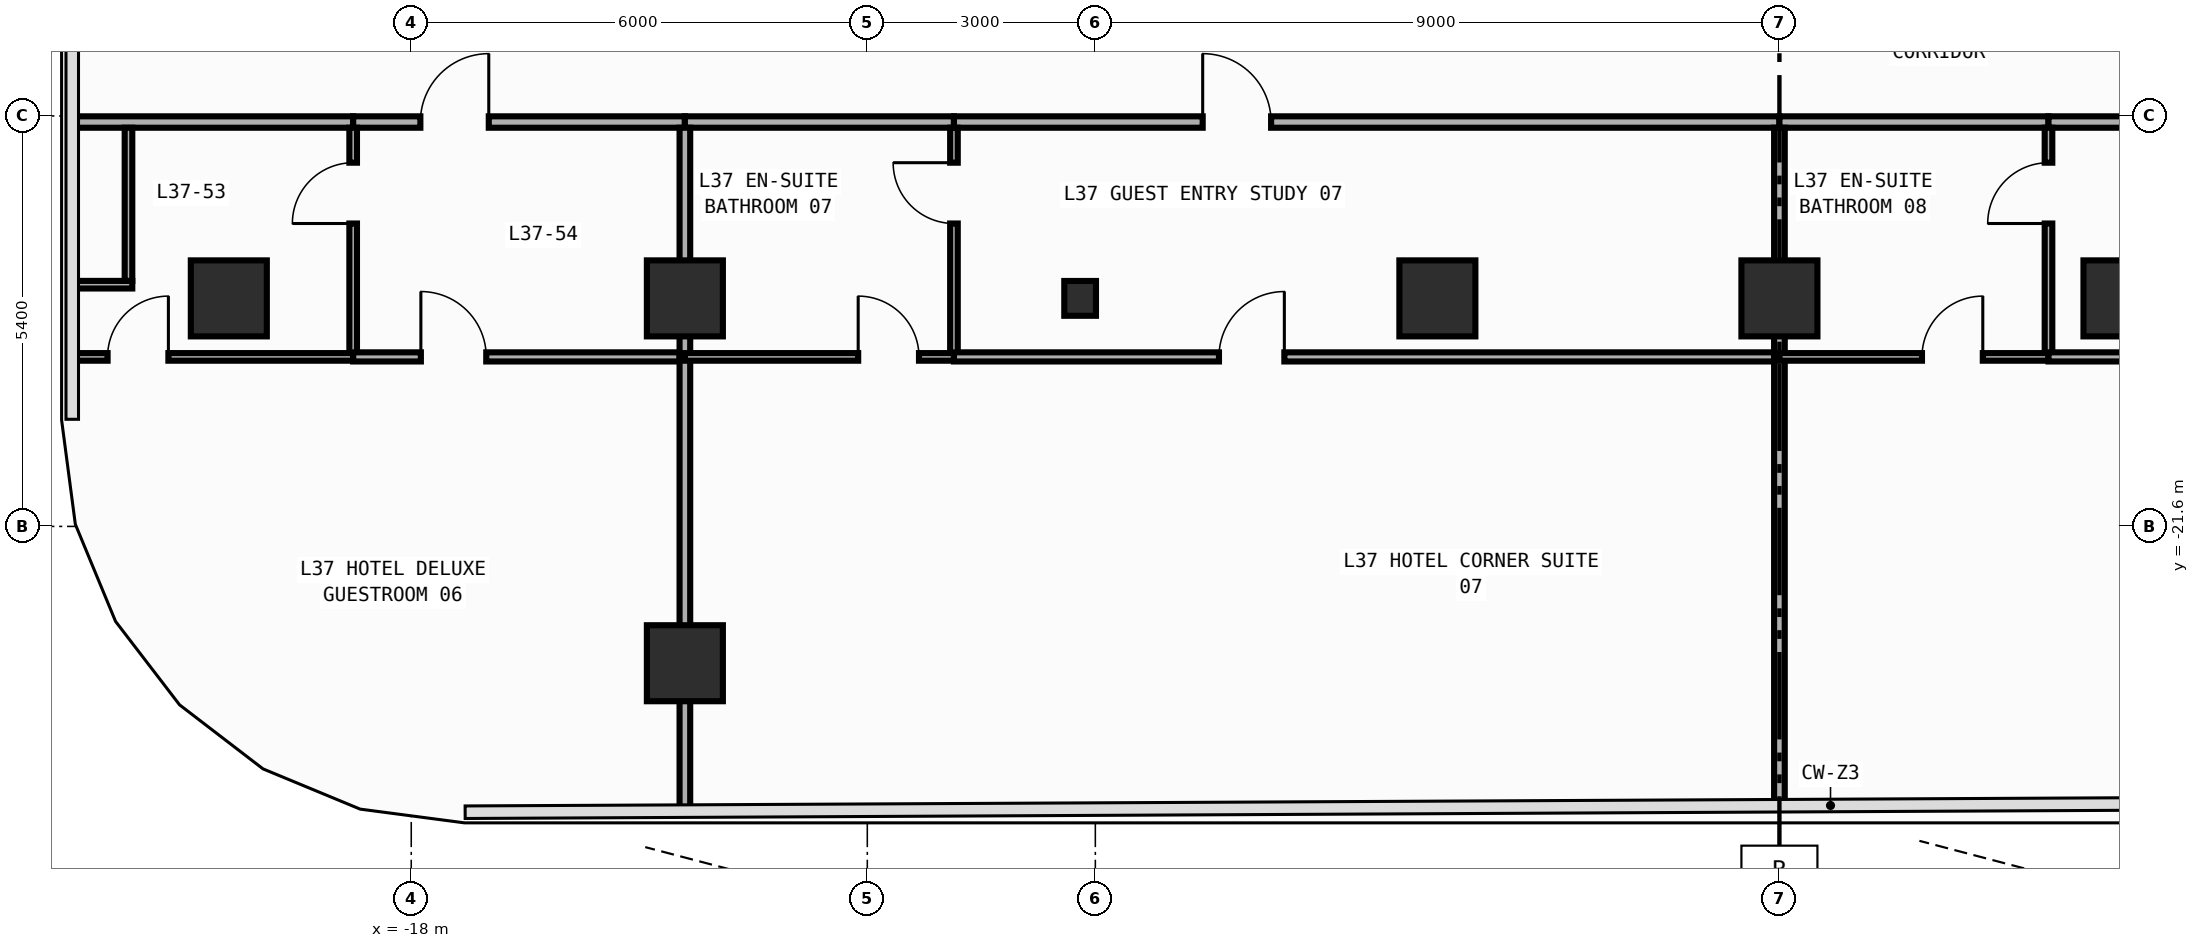
"""IFC4 building model, lengths in metres.
Left out: names, types, materials, properties, quantities, classifications, styles, units other than length and angle.
Written with IfcOpenShell. Run it as: python <this file> out.ifc"""

import sys

from ifc_helpers import new_model, si_unit, direction, frame, frame_2d, origin, origin_2d, place, context, subcontext, project, spatial, rectangle, i_section, extrude, element, fill, save


model = new_model("IFC4")
c1 = context("Model", 3, precision=1e-05, world=origin(), true_north=direction((0.0, 1.0)))
c2 = subcontext(c1, "Body", "Model", "MODEL_VIEW")
j1 = project(units=[si_unit("LENGTHUNIT", "METRE"), si_unit("PLANEANGLEUNIT", "RADIAN")], contexts=[c1])
p1 = place(None, origin())
s1 = spatial("IfcSite", under=j1, at=p1, CompositionType="ELEMENT")
p2 = place(p1, origin())
s2 = spatial("IfcBuilding", under=s1, at=p2, CompositionType="ELEMENT")
p3 = place(p2, frame((0.0, 0.0, 165.0)))
s3 = spatial("IfcBuildingStorey", under=s2, at=p3, CompositionType="ELEMENT", Elevation=165.0)
p4 = place(p3, frame((-9.2, -18.6, 0.0), z_axis=(0.0, 0.0, 1.0), x_axis=(1.0, 0.0, 0.0)))
e1 = element("IfcColumn", 1, at=p4, inside=s3, PredefinedType="COLUMN", context=c2, shape_type="SweptSolid", body=[
    extrude(i_section(OverallWidth=0.417, OverallDepth=0.458, WebThickness=0.03, FlangeThickness=0.05, FilletRadius=0.022, at=origin_2d()), origin(), (0.0, 0.0, 1.0), 3.8),
])
for number, where, z_axis, x_axis in (
    (2, (-20.4, -18.6, 0.0), (0.0, 0.0, 1.0), (1.0, 0.0, 0.0)),
    (3, (-14.4, -18.6, 0.0), (0.0, 0.0, 1.0), (1.0, 0.0, 0.0)),
    (4, (-4.5, -18.6, 0.0), (0.0, 0.0, 1.0), (1.0, 0.0, 0.0)),
    (5, (0.0, -18.6, 0.0), (0.0, 0.0, 1.0), (1.0, 0.0, 0.0)),
    (6, (4.5, -18.6, 0.0), (0.0, 0.0, 1.0), (1.0, 0.0, 0.0)),
    (7, (-14.4, -23.4, 0.0), (0.0, 0.0, 1.0), (1.0, 0.0, 0.0)),
):
    element("IfcColumn", number, at=place(p3, frame(where, z_axis=z_axis, x_axis=x_axis)), inside=s3, PredefinedType="COLUMN", context=c2, shape_type="SweptSolid", body=[
        extrude(rectangle(XDim=1.0, YDim=1.0, at=origin_2d()), origin(), (0.0, 0.0, 1.0), 3.8),
    ])
p5 = place(p3, frame((-22.455, -16.28, 0.0), z_axis=(0.0, 0.0, 1.0), x_axis=(1.0, 0.0, 0.0)))
e8 = element("IfcWall", 8, at=p5, inside=s3, PredefinedType="PARTITIONING", context=c2, shape_type="SweptSolid", body=[
    extrude(rectangle(XDim=3.691, YDim=0.15, at=frame_2d((1.846, 0.0))), origin(), (0.0, 0.0, 1.0), 3.54),
])
p6 = place(p3, frame((-18.764, -16.28, 0.0), z_axis=(0.0, 0.0, 1.0), x_axis=(1.0, 0.0, 0.0)))
e9 = element("IfcWall", 9, at=p6, inside=s3, PredefinedType="PARTITIONING", context=c2, shape_type="SweptSolid", body=[
    extrude(rectangle(XDim=4.364, YDim=0.15, at=frame_2d((2.182, 0.0))), origin(), (0.0, 0.0, 1.0), 3.54),
])
p7 = place(p6, frame((0.884, 0.0, 0.0)))
e10 = element("IfcOpeningElement", 10, at=p7, cuts=e9, PredefinedType="OPENING", context=c2, shape_type="SweptSolid", body=[
    extrude(rectangle(XDim=0.9, YDim=2.15, at=frame_2d((0.45, 1.075))), frame((0.0, 0.085, 0.0), z_axis=(0.0, -1.0, 0.0), x_axis=(1.0, 0.0, 0.0)), (0.0, 0.0, 1.0), 0.17),
])
p8 = place(p3, frame((-14.4, -16.28, 0.0), z_axis=(0.0, 0.0, 1.0), x_axis=(1.0, 0.0, 0.0)))
e11 = element("IfcWall", 11, at=p8, inside=s3, PredefinedType="PARTITIONING", context=c2, shape_type="SweptSolid", body=[
    extrude(rectangle(XDim=3.54, YDim=0.15, at=frame_2d((1.77, 0.0))), origin(), (0.0, 0.0, 1.0), 3.54),
])
p9 = place(p3, frame((-10.86, -16.28, 0.0), z_axis=(0.0, 0.0, 1.0), x_axis=(1.0, 0.0, 0.0)))
e12 = element("IfcWall", 12, at=p9, inside=s3, PredefinedType="PARTITIONING", context=c2, shape_type="SweptSolid", body=[
    extrude(rectangle(XDim=10.86, YDim=0.15, at=frame_2d((5.43, 0.0))), origin(), (0.0, 0.0, 1.0), 3.54),
])
p10 = place(p9, frame((3.272, 0.0, 0.0)))
e13 = element("IfcOpeningElement", 13, at=p10, cuts=e12, PredefinedType="OPENING", context=c2, shape_type="SweptSolid", body=[
    extrude(rectangle(XDim=0.9, YDim=2.15, at=frame_2d((0.45, 1.075))), frame((0.0, 0.085, 0.0), z_axis=(0.0, -1.0, 0.0), x_axis=(1.0, 0.0, 0.0)), (0.0, 0.0, 1.0), 0.17),
])
p11 = place(p3, frame((0.0, -16.28, 0.0), z_axis=(0.0, 0.0, 1.0), x_axis=(1.0, 0.0, 0.0)))
e14 = element("IfcWall", 14, at=p11, inside=s3, PredefinedType="PARTITIONING", context=c2, shape_type="SweptSolid", body=[
    extrude(rectangle(XDim=3.54, YDim=0.15, at=frame_2d((1.77, 0.0))), origin(), (0.0, 0.0, 1.0), 3.54),
])
p12 = place(p3, frame((3.54, -16.28, 0.0), z_axis=(0.0, 0.0, 1.0), x_axis=(1.0, 0.0, 0.0)))
e15 = element("IfcWall", 15, at=p12, inside=s3, PredefinedType="PARTITIONING", context=c2, shape_type="SweptSolid", body=[
    extrude(rectangle(XDim=8.7, YDim=0.15, at=frame_2d((4.35, 0.0))), origin(), (0.0, 0.0, 1.0), 3.54),
])
p13 = place(p12, frame((7.34, 0.0, 0.0)))
e16 = element("IfcOpeningElement", 16, at=p13, cuts=e15, PredefinedType="OPENING", context=c2, shape_type="SweptSolid", body=[
    extrude(rectangle(XDim=0.9, YDim=2.15, at=frame_2d((0.45, 1.075))), frame((0.0, 0.085, 0.0), z_axis=(0.0, -1.0, 0.0), x_axis=(1.0, 0.0, 0.0)), (0.0, 0.0, 1.0), 0.17),
])
p14 = place(p3, frame((-18.764, -19.32, 0.0), z_axis=(0.0, 0.0, 1.0), x_axis=(0.0, 1.0, 0.0)))
e17 = element("IfcWall", 17, at=p14, inside=s3, PredefinedType="PARTITIONING", context=c2, shape_type="SweptSolid", body=[
    extrude(rectangle(XDim=2.965, YDim=0.1, at=frame_2d((1.482, 0.0))), origin(), (0.0, 0.0, 1.0), 3.54),
])
p15 = place(p14, frame((1.705, 0.0, 0.0)))
e18 = element("IfcOpeningElement", 18, at=p15, cuts=e17, PredefinedType="OPENING", context=c2, shape_type="SweptSolid", body=[
    extrude(rectangle(XDim=0.8, YDim=2.1, at=frame_2d((0.4, 1.05))), frame((0.0, 0.06, 0.0), z_axis=(0.0, -1.0, 0.0), x_axis=(1.0, 0.0, 0.0)), (0.0, 0.0, 1.0), 0.12),
])
p16 = place(p3, frame((-22.455, -19.37, 0.0), z_axis=(0.0, 0.0, 1.0), x_axis=(1.0, 0.0, 0.0)))
e19 = element("IfcWall", 19, at=p16, inside=s3, PredefinedType="PARTITIONING", context=c2, shape_type="SweptSolid", body=[
    extrude(rectangle(XDim=3.691, YDim=0.1, at=frame_2d((1.846, 0.0))), origin(), (0.0, 0.0, 1.0), 3.54),
])
p17 = place(p16, frame((0.46, 0.0, 0.0)))
e20 = element("IfcOpeningElement", 20, at=p17, cuts=e19, PredefinedType="OPENING", context=c2, shape_type="SweptSolid", body=[
    extrude(rectangle(XDim=0.8, YDim=2.1, at=frame_2d((0.4, 1.05))), frame((0.0, 0.06, 0.0), z_axis=(0.0, -1.0, 0.0), x_axis=(1.0, 0.0, 0.0)), (0.0, 0.0, 1.0), 0.12),
])
p18 = place(p3, frame((-18.764, -19.37, 0.0), z_axis=(0.0, 0.0, 1.0), x_axis=(1.0, 0.0, 0.0)))
e21 = element("IfcWall", 21, at=p18, inside=s3, PredefinedType="PARTITIONING", context=c2, shape_type="SweptSolid", body=[
    extrude(rectangle(XDim=4.364, YDim=0.12, at=frame_2d((2.182, 0.0))), origin(), (0.0, 0.0, 1.0), 3.54),
])
p19 = place(p18, frame((0.891, 0.0, 0.0)))
e22 = element("IfcOpeningElement", 22, at=p19, cuts=e21, PredefinedType="OPENING", context=c2, shape_type="SweptSolid", body=[
    extrude(rectangle(XDim=0.86, YDim=2.15, at=frame_2d((0.43, 1.075))), frame((0.0, 0.07, 0.0), z_axis=(0.0, -1.0, 0.0), x_axis=(1.0, 0.0, 0.0)), (0.0, 0.0, 1.0), 0.14),
])
p20 = place(p3, frame((-14.4, -19.37, 0.0), z_axis=(0.0, 0.0, 1.0), x_axis=(0.0, 1.0, 0.0)))
e23 = element("IfcWall", 23, at=p20, inside=s3, PredefinedType="PARTITIONING", context=c2, shape_type="SweptSolid", body=[
    extrude(rectangle(XDim=3.015, YDim=0.14, at=frame_2d((1.508, 0.0))), origin(), (0.0, 0.0, 1.0), 2.952),
])
p21 = place(p3, frame((-14.4, -25.341, 0.0), z_axis=(0.0, 0.0, 1.0), x_axis=(0.0, 1.0, 0.0)))
e24 = element("IfcWall", 24, at=p21, inside=s3, PredefinedType="PARTITIONING", context=c2, shape_type="SweptSolid", body=[
    extrude(rectangle(XDim=5.971, YDim=0.14, at=frame_2d((2.985, 0.0))), origin(), (0.0, 0.0, 1.0), 2.952),
])
p22 = place(p3, frame((-10.86, -19.32, 0.0), z_axis=(0.0, 0.0, 1.0), x_axis=(0.0, 1.0, 0.0)))
e25 = element("IfcWall", 25, at=p22, inside=s3, PredefinedType="PARTITIONING", context=c2, shape_type="SweptSolid", body=[
    extrude(rectangle(XDim=2.965, YDim=0.1, at=frame_2d((1.482, 0.0))), origin(), (0.0, 0.0, 1.0), 3.54),
])
p23 = place(p22, frame((1.705, 0.0, 0.0)))
e26 = element("IfcOpeningElement", 26, at=p23, cuts=e25, PredefinedType="OPENING", context=c2, shape_type="SweptSolid", body=[
    extrude(rectangle(XDim=0.8, YDim=2.1, at=frame_2d((0.4, 1.05))), frame((0.0, 0.06, 0.0), z_axis=(0.0, -1.0, 0.0), x_axis=(1.0, 0.0, 0.0)), (0.0, 0.0, 1.0), 0.12),
])
p24 = place(p3, frame((-14.4, -19.37, 0.0), z_axis=(0.0, 0.0, 1.0), x_axis=(1.0, 0.0, 0.0)))
e27 = element("IfcWall", 27, at=p24, inside=s3, PredefinedType="PARTITIONING", context=c2, shape_type="SweptSolid", body=[
    extrude(rectangle(XDim=3.54, YDim=0.1, at=frame_2d((1.77, 0.0))), origin(), (0.0, 0.0, 1.0), 3.54),
])
p25 = place(p24, frame((2.28, 0.0, 0.0)))
e28 = element("IfcOpeningElement", 28, at=p25, cuts=e27, PredefinedType="OPENING", context=c2, shape_type="SweptSolid", body=[
    extrude(rectangle(XDim=0.8, YDim=2.1, at=frame_2d((0.4, 1.05))), frame((0.0, 0.06, 0.0), z_axis=(0.0, -1.0, 0.0), x_axis=(1.0, 0.0, 0.0)), (0.0, 0.0, 1.0), 0.12),
])
p26 = place(p3, frame((-10.86, -19.37, 0.0), z_axis=(0.0, 0.0, 1.0), x_axis=(1.0, 0.0, 0.0)))
e29 = element("IfcWall", 29, at=p26, inside=s3, PredefinedType="PARTITIONING", context=c2, shape_type="SweptSolid", body=[
    extrude(rectangle(XDim=10.86, YDim=0.12, at=frame_2d((5.43, 0.0))), origin(), (0.0, 0.0, 1.0), 3.54),
])
p27 = place(p26, frame((3.487, 0.0, 0.0)))
e30 = element("IfcOpeningElement", 30, at=p27, cuts=e29, PredefinedType="OPENING", context=c2, shape_type="SweptSolid", body=[
    extrude(rectangle(XDim=0.86, YDim=2.15, at=frame_2d((0.43, 1.075))), frame((0.0, 0.07, 0.0), z_axis=(0.0, -1.0, 0.0), x_axis=(1.0, 0.0, 0.0)), (0.0, 0.0, 1.0), 0.14),
])
p28 = place(p3, frame((0.0, -19.37, 0.0), z_axis=(0.0, 0.0, 1.0), x_axis=(0.0, 1.0, 0.0)))
e31 = element("IfcWall", 31, at=p28, inside=s3, PredefinedType="PARTITIONING", context=c2, shape_type="SweptSolid", body=[
    extrude(rectangle(XDim=3.015, YDim=0.14, at=frame_2d((1.508, 0.0))), origin(), (0.0, 0.0, 1.0), 3.54),
])
p29 = place(p3, frame((0.0, -25.27, 0.0), z_axis=(0.0, 0.0, 1.0), x_axis=(0.0, 1.0, 0.0)))
e32 = element("IfcWall", 32, at=p29, inside=s3, PredefinedType="PARTITIONING", context=c2, shape_type="SweptSolid", body=[
    extrude(rectangle(XDim=5.9, YDim=0.14, at=frame_2d((2.95, 0.0))), origin(), (0.0, 0.0, 1.0), 3.54),
])
p30 = place(p3, frame((3.54, -19.32, 0.0), z_axis=(0.0, 0.0, 1.0), x_axis=(0.0, 1.0, 0.0)))
e33 = element("IfcWall", 33, at=p30, inside=s3, PredefinedType="PARTITIONING", context=c2, shape_type="SweptSolid", body=[
    extrude(rectangle(XDim=2.965, YDim=0.1, at=frame_2d((1.482, 0.0))), origin(), (0.0, 0.0, 1.0), 3.54),
])
p31 = place(p30, frame((1.705, 0.0, 0.0)))
e34 = element("IfcOpeningElement", 34, at=p31, cuts=e33, PredefinedType="OPENING", context=c2, shape_type="SweptSolid", body=[
    extrude(rectangle(XDim=0.8, YDim=2.1, at=frame_2d((0.4, 1.05))), frame((0.0, 0.06, 0.0), z_axis=(0.0, -1.0, 0.0), x_axis=(1.0, 0.0, 0.0)), (0.0, 0.0, 1.0), 0.12),
])
p32 = place(p3, frame((0.0, -19.37, 0.0), z_axis=(0.0, 0.0, 1.0), x_axis=(1.0, 0.0, 0.0)))
e35 = element("IfcWall", 35, at=p32, inside=s3, PredefinedType="PARTITIONING", context=c2, shape_type="SweptSolid", body=[
    extrude(rectangle(XDim=3.54, YDim=0.1, at=frame_2d((1.77, 0.0))), origin(), (0.0, 0.0, 1.0), 3.54),
])
p33 = place(p32, frame((1.875, 0.0, 0.0)))
e36 = element("IfcOpeningElement", 36, at=p33, cuts=e35, PredefinedType="OPENING", context=c2, shape_type="SweptSolid", body=[
    extrude(rectangle(XDim=0.8, YDim=2.1, at=frame_2d((0.4, 1.05))), frame((0.0, 0.06, 0.0), z_axis=(0.0, -1.0, 0.0), x_axis=(1.0, 0.0, 0.0)), (0.0, 0.0, 1.0), 0.12),
])
p34 = place(p3, frame((3.54, -19.37, 0.0), z_axis=(0.0, 0.0, 1.0), x_axis=(1.0, 0.0, 0.0)))
e37 = element("IfcWall", 37, at=p34, inside=s3, PredefinedType="PARTITIONING", context=c2, shape_type="SweptSolid", body=[
    extrude(rectangle(XDim=8.7, YDim=0.12, at=frame_2d((4.35, 0.0))), origin(), (0.0, 0.0, 1.0), 3.54),
])
p35 = place(p34, frame((7.38, 0.0, 0.0)))
e38 = element("IfcOpeningElement", 38, at=p35, cuts=e37, PredefinedType="OPENING", context=c2, shape_type="SweptSolid", body=[
    extrude(rectangle(XDim=0.86, YDim=2.15, at=frame_2d((0.43, 1.075))), frame((0.0, 0.07, 0.0), z_axis=(0.0, -1.0, 0.0), x_axis=(1.0, 0.0, 0.0)), (0.0, 0.0, 1.0), 0.14),
])
p36 = place(p3, frame((-21.67, -18.42, 0.0), z_axis=(0.0, 0.0, 1.0), x_axis=(-1.0, 0.0, 0.0)))
e39 = element("IfcWall", 39, at=p36, inside=s3, PredefinedType="PARTITIONING", context=c2, shape_type="SweptSolid", body=[
    extrude(rectangle(XDim=0.785, YDim=0.1, at=frame_2d((0.393, 0.0))), origin(), (0.0, 0.0, 1.0), 3.54),
])
p37 = place(p3, frame((-21.72, -18.37, 0.0), z_axis=(0.0, 0.0, 1.0), x_axis=(0.0, 1.0, 0.0)))
e40 = element("IfcWall", 40, at=p37, inside=s3, PredefinedType="PARTITIONING", context=c2, shape_type="SweptSolid", body=[
    extrude(rectangle(XDim=2.015, YDim=0.1, at=frame_2d((1.008, 0.0))), origin(), (0.0, 0.0, 1.0), 3.54),
])
p38 = place(p7, origin())
e41 = element("IfcDoor", 41, at=p38, inside=s3, OperationType="SINGLE_SWING_RIGHT", PredefinedType="DOOR", context=c2, shape_type="SweptSolid", body=[
    extrude(rectangle(XDim=0.9, YDim=2.15, at=frame_2d((0.45, 1.075))), frame((0.0, 0.025, 0.0), z_axis=(0.0, -1.0, 0.0), x_axis=(1.0, 0.0, 0.0)), (0.0, 0.0, 1.0), 0.05),
])
fill(e10, e41)
p39 = place(p10, origin())
e42 = element("IfcDoor", 42, at=p39, inside=s3, OperationType="SINGLE_SWING_LEFT", PredefinedType="DOOR", context=c2, shape_type="SweptSolid", body=[
    extrude(rectangle(XDim=0.9, YDim=2.15, at=frame_2d((0.45, 1.075))), frame((0.0, 0.025, 0.0), z_axis=(0.0, -1.0, 0.0), x_axis=(1.0, 0.0, 0.0)), (0.0, 0.0, 1.0), 0.05),
])
fill(e13, e42)
p40 = place(p15, origin())
e43 = element("IfcDoor", 43, at=p40, inside=s3, OperationType="SINGLE_SWING_LEFT", PredefinedType="DOOR", context=c2, shape_type="SweptSolid", body=[
    extrude(rectangle(XDim=0.8, YDim=2.1, at=frame_2d((0.4, 1.05))), frame((0.0, 0.025, 0.0), z_axis=(0.0, -1.0, 0.0), x_axis=(1.0, 0.0, 0.0)), (0.0, 0.0, 1.0), 0.05),
])
fill(e18, e43)
p41 = place(p17, origin())
e44 = element("IfcDoor", 44, at=p41, inside=s3, OperationType="SINGLE_SWING_RIGHT", PredefinedType="DOOR", context=c2, shape_type="SweptSolid", body=[
    extrude(rectangle(XDim=0.8, YDim=2.1, at=frame_2d((0.4, 1.05))), frame((0.0, 0.025, 0.0), z_axis=(0.0, -1.0, 0.0), x_axis=(1.0, 0.0, 0.0)), (0.0, 0.0, 1.0), 0.05),
])
fill(e20, e44)
p42 = place(p19, origin())
e45 = element("IfcDoor", 45, at=p42, inside=s3, OperationType="SINGLE_SWING_LEFT", PredefinedType="DOOR", context=c2, shape_type="SweptSolid", body=[
    extrude(rectangle(XDim=0.86, YDim=2.15, at=frame_2d((0.43, 1.075))), frame((0.0, 0.025, 0.0), z_axis=(0.0, -1.0, 0.0), x_axis=(1.0, 0.0, 0.0)), (0.0, 0.0, 1.0), 0.05),
])
fill(e22, e45)
p43 = place(p23, origin())
e46 = element("IfcDoor", 46, at=p43, inside=s3, OperationType="SINGLE_SWING_RIGHT", PredefinedType="DOOR", context=c2, shape_type="SweptSolid", body=[
    extrude(rectangle(XDim=0.8, YDim=2.1, at=frame_2d((0.4, 1.05))), frame((0.0, 0.025, 0.0), z_axis=(0.0, -1.0, 0.0), x_axis=(1.0, 0.0, 0.0)), (0.0, 0.0, 1.0), 0.05),
])
fill(e26, e46)
p44 = place(p25, origin())
e47 = element("IfcDoor", 47, at=p44, inside=s3, OperationType="SINGLE_SWING_LEFT", PredefinedType="DOOR", context=c2, shape_type="SweptSolid", body=[
    extrude(rectangle(XDim=0.8, YDim=2.1, at=frame_2d((0.4, 1.05))), frame((0.0, 0.025, 0.0), z_axis=(0.0, -1.0, 0.0), x_axis=(1.0, 0.0, 0.0)), (0.0, 0.0, 1.0), 0.05),
])
fill(e28, e47)
p45 = place(p27, origin())
e48 = element("IfcDoor", 48, at=p45, inside=s3, OperationType="SINGLE_SWING_RIGHT", PredefinedType="DOOR", context=c2, shape_type="SweptSolid", body=[
    extrude(rectangle(XDim=0.86, YDim=2.15, at=frame_2d((0.43, 1.075))), frame((0.0, 0.025, 0.0), z_axis=(0.0, -1.0, 0.0), x_axis=(1.0, 0.0, 0.0)), (0.0, 0.0, 1.0), 0.05),
])
fill(e30, e48)
p46 = place(p31, origin())
e49 = element("IfcDoor", 49, at=p46, inside=s3, OperationType="SINGLE_SWING_LEFT", PredefinedType="DOOR", context=c2, shape_type="SweptSolid", body=[
    extrude(rectangle(XDim=0.8, YDim=2.1, at=frame_2d((0.4, 1.05))), frame((0.0, 0.025, 0.0), z_axis=(0.0, -1.0, 0.0), x_axis=(1.0, 0.0, 0.0)), (0.0, 0.0, 1.0), 0.05),
])
fill(e34, e49)
p47 = place(p33, origin())
e50 = element("IfcDoor", 50, at=p47, inside=s3, OperationType="SINGLE_SWING_RIGHT", PredefinedType="DOOR", context=c2, shape_type="SweptSolid", body=[
    extrude(rectangle(XDim=0.8, YDim=2.1, at=frame_2d((0.4, 1.05))), frame((0.0, 0.025, 0.0), z_axis=(0.0, -1.0, 0.0), x_axis=(1.0, 0.0, 0.0)), (0.0, 0.0, 1.0), 0.05),
])
fill(e36, e50)
save(model, sys.argv[1])
